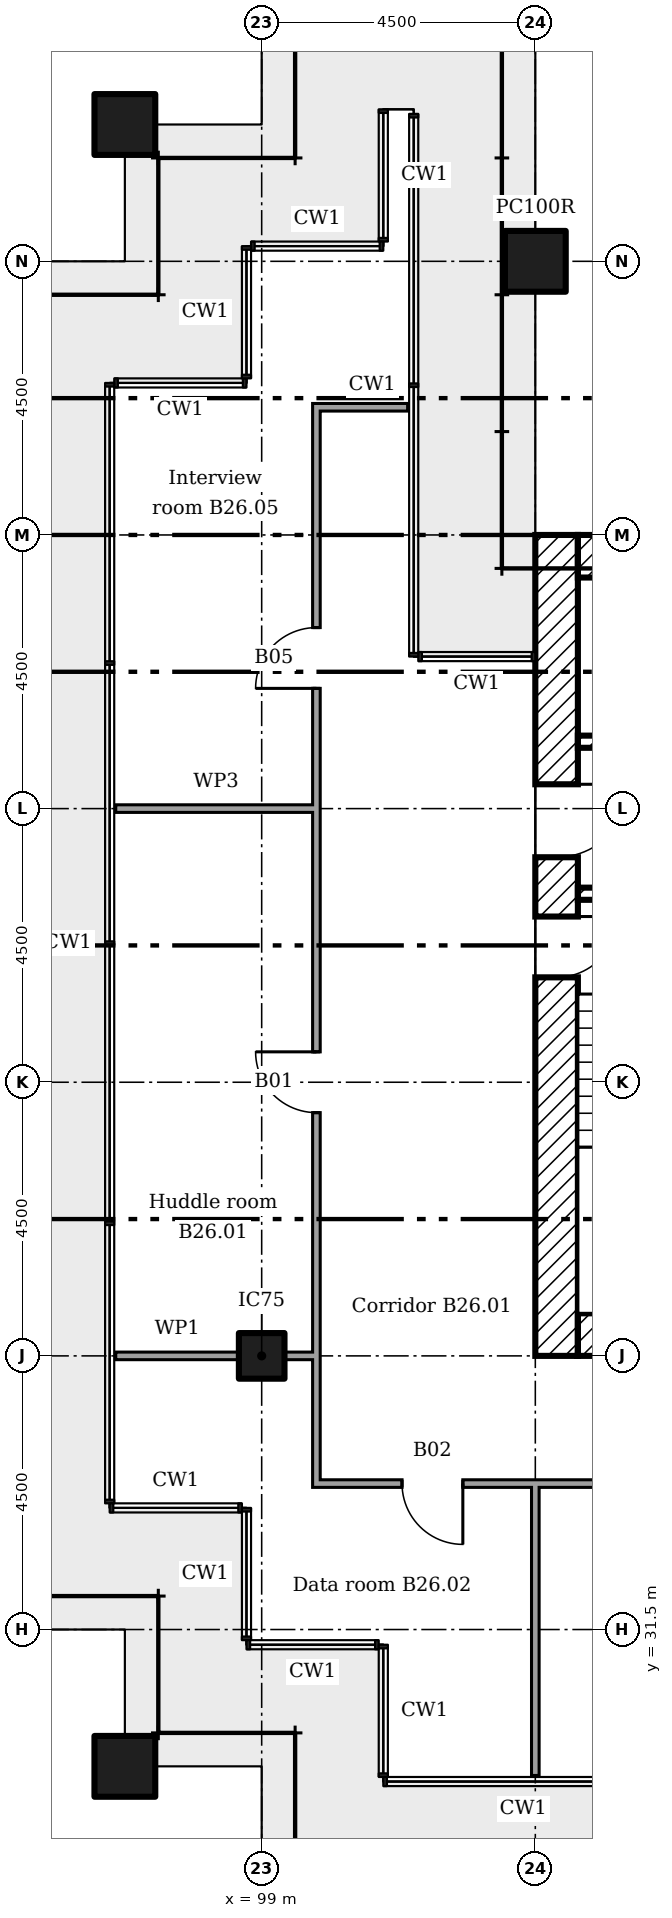
"""IFC4 building model, lengths in metres.
Left out: names, types, materials, properties, quantities, classifications, styles, units other than length and angle.
Written with IfcOpenShell. Run it as: python <this file> out.ifc"""

import sys

from ifc_helpers import new_model, si_unit, direction, frame, frame_2d, origin, origin_2d, place, context, subcontext, project, spatial, rectangle, extrude, element, fill, save


model = new_model("IFC4")
c1 = context("Model", 3, precision=1e-05, world=origin(), true_north=direction((0.0, 1.0)))
c2 = subcontext(c1, "Body", "Model", "MODEL_VIEW")
j1 = project(units=[si_unit("LENGTHUNIT", "METRE"), si_unit("PLANEANGLEUNIT", "RADIAN")], contexts=[c1])
p1 = place(None, origin())
s1 = spatial("IfcSite", under=j1, at=p1, CompositionType="ELEMENT")
p2 = place(p1, origin())
s2 = spatial("IfcBuilding", under=s1, at=p2, CompositionType="ELEMENT")
p3 = place(p2, frame((0.0, 0.0, 106.4)))
s3 = spatial("IfcBuildingStorey", under=s2, at=p3, CompositionType="ELEMENT", Elevation=106.4)
for number, where in (
    (1, (103.5, 54.0, 0.0)),
    (2, (96.75, 56.25, 0.0)),
    (3, (96.75, 29.25, 0.0)),
):
    element("IfcColumn", number, at=place(p3, frame(where)), inside=s3, PredefinedType="COLUMN", context=c2, shape_type="SweptSolid", body=[
        extrude(rectangle(XDim=1.0, YDim=1.0, at=origin_2d()), origin(), (0.0, 0.0, 1.0), 3.6),
    ])
p4 = place(p3, frame((99.0, 36.0, 0.0)))
e4 = element("IfcColumn", 4, at=p4, inside=s3, PredefinedType="COLUMN", context=c2, shape_type="SweptSolid", body=[
    extrude(rectangle(XDim=0.75, YDim=0.75, at=origin_2d()), origin(), (0.0, 0.0, 1.0), 3.6),
])
for number, where in (
    (5, (104.2, 49.15, 0.0)),
    (6, (104.2, 36.35, 0.0)),
):
    element("IfcWall", number, at=place(p3, frame(where)), inside=s3, PredefinedType="SHEAR", context=c2, shape_type="SweptSolid", body=[
        extrude(rectangle(XDim=12.1, YDim=0.7, at=frame_2d((6.05, 0.0))), origin(), (0.0, 0.0, 1.0), 3.35),
    ])
p5 = place(p3, frame((103.85, 36.0, 0.0), z_axis=(0.0, 0.0, 1.0), x_axis=(0.0, 1.0, 0.0)))
e7 = element("IfcWall", 7, at=p5, inside=s3, PredefinedType="SHEAR", context=c2, shape_type="SweptSolid", body=[
    extrude(rectangle(XDim=13.5, YDim=0.7, at=frame_2d((6.75, 0.0))), origin(), (0.0, 0.0, 1.0), 3.35),
])
p6 = place(p5, frame((8.2, 0.0, 0.0)))
e8 = element("IfcOpeningElement", 8, at=p6, cuts=e7, PredefinedType="OPENING", context=c2, shape_type="SweptSolid", body=[
    extrude(rectangle(XDim=1.2, YDim=2.1, at=frame_2d((0.6, 1.05))), frame((0.0, 0.36, 0.0), z_axis=(0.0, -1.0, 0.0), x_axis=(1.0, 0.0, 0.0)), (0.0, 0.0, 1.0), 0.72),
])
p7 = place(p5, frame((6.225, 0.0, 0.0)))
e9 = element("IfcOpeningElement", 9, at=p7, cuts=e7, PredefinedType="OPENING", context=c2, shape_type="SweptSolid", body=[
    extrude(rectangle(XDim=1.0, YDim=2.1, at=frame_2d((0.5, 1.05))), frame((0.0, 0.36, 0.0), z_axis=(0.0, -1.0, 0.0), x_axis=(1.0, 0.0, 0.0)), (0.0, 0.0, 1.0), 0.72),
])
p8 = place(p3, frame((104.2, 46.1, 0.0)))
e10 = element("IfcWall", 10, at=p8, inside=s3, PredefinedType="SHEAR", context=c2, shape_type="SweptSolid", body=[
    extrude(rectangle(XDim=3.133, YDim=0.2, at=frame_2d((1.567, 0.0))), origin(), (0.0, 0.0, 1.0), 3.35),
])
p9 = place(p8, frame((1.317, 0.0, 0.0)))
e11 = element("IfcOpeningElement", 11, at=p9, cuts=e10, PredefinedType="OPENING", context=c2, shape_type="SweptSolid", body=[
    extrude(rectangle(XDim=0.9, YDim=2.1, at=frame_2d((0.45, 1.05))), frame((0.0, 0.11, 0.0), z_axis=(0.0, -1.0, 0.0), x_axis=(1.0, 0.0, 0.0)), (0.0, 0.0, 1.0), 0.22),
])
p10 = place(p3, frame((104.2, 43.6, 0.0)))
e12 = element("IfcWall", 12, at=p10, inside=s3, PredefinedType="SHEAR", context=c2, shape_type="SweptSolid", body=[
    extrude(rectangle(XDim=2.8, YDim=0.2, at=frame_2d((1.4, 0.0))), origin(), (0.0, 0.0, 1.0), 3.35),
])
p11 = place(p10, frame((1.05, 0.0, 0.0)))
e13 = element("IfcOpeningElement", 13, at=p11, cuts=e12, PredefinedType="OPENING", context=c2, shape_type="SweptSolid", body=[
    extrude(rectangle(XDim=1.0, YDim=2.1, at=frame_2d((0.5, 1.05))), frame((0.0, 0.11, 0.0), z_axis=(0.0, -1.0, 0.0), x_axis=(1.0, 0.0, 0.0)), (0.0, 0.0, 1.0), 0.22),
])
p12 = place(p3, frame((99.837, 33.9, 0.0)))
e14 = element("IfcWall", 14, at=p12, inside=s3, PredefinedType="PARTITIONING", context=c2, shape_type="SweptSolid", body=[
    extrude(rectangle(XDim=20.225, YDim=0.125, at=frame_2d((10.113, 0.0))), origin(), (0.0, 0.0, 1.0), 3.45),
])
p13 = place(p12, frame((1.47, 0.0, 0.0)))
e15 = element("IfcOpeningElement", 15, at=p13, cuts=e14, PredefinedType="OPENING", context=c2, shape_type="SweptSolid", body=[
    extrude(rectangle(XDim=1.0, YDim=2.1, at=frame_2d((0.5, 1.05))), frame((0.0, 0.073, 0.0), z_axis=(0.0, -1.0, 0.0), x_axis=(1.0, 0.0, 0.0)), (0.0, 0.0, 1.0), 0.145),
])
p14 = place(p12, frame((11.942, 0.0, 0.0)))
e16 = element("IfcOpeningElement", 16, at=p14, cuts=e14, PredefinedType="OPENING", context=c2, shape_type="SweptSolid", body=[
    extrude(rectangle(XDim=1.0, YDim=2.1, at=frame_2d((0.5, 1.05))), frame((0.0, 0.073, 0.0), z_axis=(0.0, -1.0, 0.0), x_axis=(1.0, 0.0, 0.0)), (0.0, 0.0, 1.0), 0.145),
])
p15 = place(p3, frame((96.6, 36.0, 0.0)))
e17 = element("IfcWall", 17, at=p15, inside=s3, PredefinedType="PARTITIONING", context=c2, shape_type="SweptSolid", body=[
    extrude(rectangle(XDim=2.025, YDim=0.125, at=frame_2d((1.012, 0.0))), origin(), (0.0, 0.0, 1.0), 2.842),
])
p16 = place(p3, frame((99.375, 36.0, 0.0)))
e18 = element("IfcWall", 18, at=p16, inside=s3, PredefinedType="PARTITIONING", context=c2, shape_type="SweptSolid", body=[
    extrude(rectangle(XDim=0.525, YDim=0.125, at=frame_2d((0.262, 0.0))), origin(), (0.0, 0.0, 1.0), 2.842),
])
p17 = place(p3, frame((96.6, 45.0, 0.0)))
e19 = element("IfcWall", 19, at=p17, inside=s3, PredefinedType="MOVABLE", context=c2, shape_type="SweptSolid", body=[
    extrude(rectangle(XDim=3.3, YDim=0.125, at=frame_2d((1.65, 0.0))), origin(), (0.0, 0.0, 1.0), 2.851),
])
p18 = place(p3, frame((99.837, 51.6, 0.0)))
e20 = element("IfcWall", 20, at=p18, inside=s3, PredefinedType="PARTITIONING", context=c2, shape_type="SweptSolid", body=[
    extrude(rectangle(XDim=1.562, YDim=0.125, at=frame_2d((0.781, 0.0))), origin(), (0.0, 0.0, 1.0), 3.45),
])
p19 = place(p3, frame((99.9, 33.962, 0.0), z_axis=(0.0, 0.0, 1.0), x_axis=(0.0, 1.0, 0.0)))
e21 = element("IfcWall", 21, at=p19, inside=s3, PredefinedType="PARTITIONING", context=c2, shape_type="SweptSolid", body=[
    extrude(rectangle(XDim=17.575, YDim=0.125, at=frame_2d((8.788, 0.0))), origin(), (0.0, 0.0, 1.0), 3.45),
])
p20 = place(p19, frame((6.038, 0.0, 0.0)))
e22 = element("IfcOpeningElement", 22, at=p20, cuts=e21, PredefinedType="OPENING", context=c2, shape_type="SweptSolid", body=[
    extrude(rectangle(XDim=1.0, YDim=2.1, at=frame_2d((0.5, 1.05))), frame((0.0, 0.073, 0.0), z_axis=(0.0, -1.0, 0.0), x_axis=(1.0, 0.0, 0.0)), (0.0, 0.0, 1.0), 0.145),
])
p21 = place(p19, frame((13.014, 0.0, 0.0)))
e23 = element("IfcOpeningElement", 23, at=p21, cuts=e21, PredefinedType="OPENING", context=c2, shape_type="SweptSolid", body=[
    extrude(rectangle(XDim=1.0, YDim=2.1, at=frame_2d((0.5, 1.05))), frame((0.0, 0.073, 0.0), z_axis=(0.0, -1.0, 0.0), x_axis=(1.0, 0.0, 0.0)), (0.0, 0.0, 1.0), 0.145),
])
p22 = place(p3, frame((103.5, 29.1, 0.0), z_axis=(0.0, 0.0, 1.0), x_axis=(0.0, 1.0, 0.0)))
e24 = element("IfcWall", 24, at=p22, inside=s3, PredefinedType="PARTITIONING", context=c2, shape_type="SweptSolid", body=[
    extrude(rectangle(XDim=4.8, YDim=0.125, at=frame_2d((2.4, 0.0))), origin(), (0.0, 0.0, 1.0), 2.851),
])
p23 = place(p6, frame((1.2, 0.0, 0.0), x_axis=(-1.0, 0.0, 0.0)))
e25 = element("IfcDoor", 25, at=p23, inside=s3, OperationType="SINGLE_SWING_RIGHT", PredefinedType="DOOR", context=c2, shape_type="SweptSolid", body=[
    extrude(rectangle(XDim=1.2, YDim=2.1, at=frame_2d((0.6, 1.05))), frame((0.0, 0.025, 0.0), z_axis=(0.0, -1.0, 0.0), x_axis=(1.0, 0.0, 0.0)), (0.0, 0.0, 1.0), 0.05),
])
fill(e8, e25)
p24 = place(p7, frame((1.0, 0.0, 0.0), x_axis=(-1.0, 0.0, 0.0)))
e26 = element("IfcDoor", 26, at=p24, inside=s3, OperationType="SINGLE_SWING_RIGHT", PredefinedType="DOOR", context=c2, shape_type="SweptSolid", body=[
    extrude(rectangle(XDim=1.0, YDim=2.1, at=frame_2d((0.5, 1.05))), frame((0.0, 0.025, 0.0), z_axis=(0.0, -1.0, 0.0), x_axis=(1.0, 0.0, 0.0)), (0.0, 0.0, 1.0), 0.05),
])
fill(e9, e26)
p25 = place(p20, origin())
e27 = element("IfcDoor", 27, at=p25, inside=s3, OperationType="SINGLE_SWING_LEFT", PredefinedType="DOOR", context=c2, shape_type="SweptSolid", body=[
    extrude(rectangle(XDim=1.0, YDim=2.1, at=frame_2d((0.5, 1.05))), frame((0.0, 0.025, 0.0), z_axis=(0.0, -1.0, 0.0), x_axis=(1.0, 0.0, 0.0)), (0.0, 0.0, 1.0), 0.05),
])
fill(e22, e27)
p26 = place(p13, frame((1.0, 0.0, 0.0), x_axis=(-1.0, 0.0, 0.0)))
e28 = element("IfcDoor", 28, at=p26, inside=s3, OperationType="SINGLE_SWING_RIGHT", PredefinedType="DOOR", context=c2, shape_type="SweptSolid", body=[
    extrude(rectangle(XDim=1.0, YDim=2.1, at=frame_2d((0.5, 1.05))), frame((0.0, 0.025, 0.0), z_axis=(0.0, -1.0, 0.0), x_axis=(1.0, 0.0, 0.0)), (0.0, 0.0, 1.0), 0.05),
])
fill(e15, e28)
p27 = place(p21, origin())
e29 = element("IfcDoor", 29, at=p27, inside=s3, OperationType="SINGLE_SWING_RIGHT", PredefinedType="DOOR", context=c2, shape_type="SweptSolid", body=[
    extrude(rectangle(XDim=1.0, YDim=2.1, at=frame_2d((0.5, 1.05))), frame((0.0, 0.025, 0.0), z_axis=(0.0, -1.0, 0.0), x_axis=(1.0, 0.0, 0.0)), (0.0, 0.0, 1.0), 0.05),
])
fill(e23, e29)
save(model, sys.argv[1])
